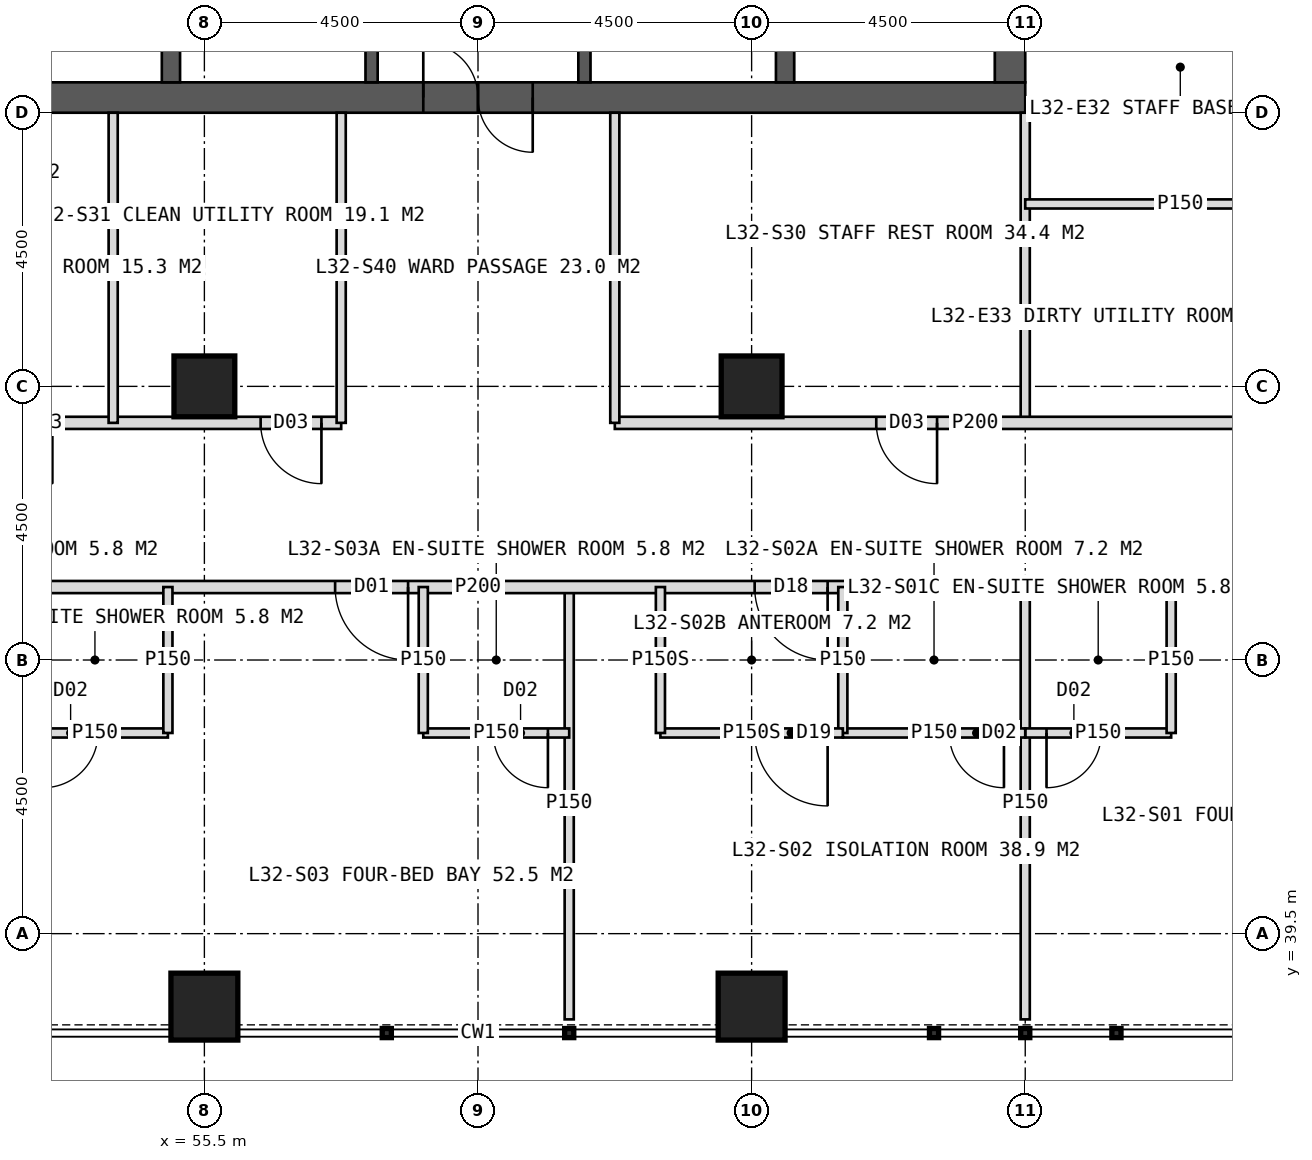
"""IFC4 building model, lengths in metres.
Left out: names, types, materials, properties, quantities, classifications, styles, units other than length and angle.
Written with IfcOpenShell. Run it as: python <this file> out.ifc"""

import sys

from ifc_helpers import new_model, si_unit, direction, frame, frame_2d, origin, origin_2d, place, context, subcontext, project, spatial, rectangle, hollow_rectangle, extrude, element, fill, save


model = new_model("IFC4")
c1 = context("Model", 3, precision=1e-05, world=origin(), true_north=direction((0.0, 1.0)))
c2 = subcontext(c1, "Body", "Model", "MODEL_VIEW")
j1 = project(units=[si_unit("LENGTHUNIT", "METRE"), si_unit("PLANEANGLEUNIT", "RADIAN")], contexts=[c1])
p1 = place(None, origin())
s1 = spatial("IfcSite", under=j1, at=p1, CompositionType="ELEMENT")
p2 = place(p1, origin())
s2 = spatial("IfcBuilding", under=s1, at=p2, CompositionType="ELEMENT")
p3 = place(p2, frame((0.0, 0.0, 136.0)))
s3 = spatial("IfcBuildingStorey", under=s2, at=p3, CompositionType="ELEMENT", Elevation=136.0)
p4 = place(p3, frame((51.0, 53.25, 0.0), z_axis=(0.0, 0.0, 1.0), x_axis=(1.0, 0.0, 0.0)))
e1 = element("IfcWall", 1, at=p4, inside=s3, PredefinedType="SHEAR", context=c2, shape_type="SweptSolid", body=[
    extrude(rectangle(XDim=18.0, YDim=0.5, at=frame_2d((9.0, 0.0))), origin(), (0.0, 0.0, 1.0), 4.0),
])
p5 = place(p4, frame((8.1, 0.0, 0.0)))
e2 = element("IfcOpeningElement", 2, at=p5, cuts=e1, PredefinedType="OPENING", context=c2, shape_type="SweptSolid", body=[
    extrude(rectangle(XDim=1.8, YDim=2.2, at=frame_2d((0.9, 1.1))), frame((0.0, 0.26, 0.0), z_axis=(0.0, -1.0, 0.0), x_axis=(1.0, 0.0, 0.0)), (0.0, 0.0, 1.0), 0.52),
])
p6 = place(p3, frame((68.75, 53.5, 0.0), z_axis=(0.0, 0.0, 1.0), x_axis=(0.0, 1.0, 0.0)))
e3 = element("IfcWall", 3, at=p6, inside=s3, PredefinedType="SHEAR", context=c2, shape_type="SweptSolid", body=[
    extrude(rectangle(XDim=17.0, YDim=0.5, at=frame_2d((8.5, 0.0))), origin(), (0.0, 0.0, 1.0), 4.0),
])
p7 = place(p6, frame((9.5, 0.0, 0.0)))
e4 = element("IfcOpeningElement", 4, at=p7, cuts=e3, PredefinedType="OPENING", context=c2, shape_type="SweptSolid", body=[
    extrude(rectangle(XDim=1.5, YDim=2.2, at=frame_2d((0.75, 1.1))), frame((0.0, 0.26, 0.0), z_axis=(0.0, -1.0, 0.0), x_axis=(1.0, 0.0, 0.0)), (0.0, 0.0, 1.0), 0.52),
])
for number, where, z_axis, x_axis in (
    (5, (54.95, 53.5, 0.0), (0.0, 0.0, 1.0), (0.0, 1.0, 0.0)),
    (6, (65.05, 53.5, 0.0), (0.0, 0.0, 1.0), (0.0, 1.0, 0.0)),
):
    element("IfcWall", number, at=place(p3, frame(where, z_axis=z_axis, x_axis=x_axis)), inside=s3, PredefinedType="SHEAR", context=c2, shape_type="SweptSolid", body=[
        extrude(rectangle(XDim=17.0, YDim=0.3, at=frame_2d((8.5, 0.0))), origin(), (0.0, 0.0, 1.0), 4.0),
    ])
p8 = place(p3, frame((58.25, 53.5, 0.0), z_axis=(0.0, 0.0, 1.0), x_axis=(0.0, 1.0, 0.0)))
e7 = element("IfcWall", 7, at=p8, inside=s3, PredefinedType="SHEAR", context=c2, shape_type="SweptSolid", body=[
    extrude(rectangle(XDim=17.0, YDim=0.2, at=frame_2d((8.5, 0.0))), origin(), (0.0, 0.0, 1.0), 4.0),
])
p9 = place(p8, frame((1.375, 0.0, 0.0)))
e8 = element("IfcOpeningElement", 8, at=p9, cuts=e7, PredefinedType="OPENING", context=c2, shape_type="SweptSolid", body=[
    extrude(rectangle(XDim=1.4, YDim=2.2, at=frame_2d((0.7, 1.1))), frame((0.0, 0.11, 0.0), z_axis=(0.0, -1.0, 0.0), x_axis=(1.0, 0.0, 0.0)), (0.0, 0.0, 1.0), 0.22),
])
p10 = place(p8, frame((5.675, 0.0, 0.0)))
e9 = element("IfcOpeningElement", 9, at=p10, cuts=e7, PredefinedType="OPENING", context=c2, shape_type="SweptSolid", body=[
    extrude(rectangle(XDim=1.4, YDim=2.2, at=frame_2d((0.7, 1.1))), frame((0.0, 0.11, 0.0), z_axis=(0.0, -1.0, 0.0), x_axis=(1.0, 0.0, 0.0)), (0.0, 0.0, 1.0), 0.22),
])
p11 = place(p3, frame((61.75, 53.5, 0.0), z_axis=(0.0, 0.0, 1.0), x_axis=(0.0, 1.0, 0.0)))
e10 = element("IfcWall", 10, at=p11, inside=s3, PredefinedType="SHEAR", context=c2, shape_type="SweptSolid", body=[
    extrude(rectangle(XDim=17.0, YDim=0.2, at=frame_2d((8.5, 0.0))), origin(), (0.0, 0.0, 1.0), 4.0),
])
p12 = place(p11, frame((1.375, 0.0, 0.0)))
e11 = element("IfcOpeningElement", 11, at=p12, cuts=e10, PredefinedType="OPENING", context=c2, shape_type="SweptSolid", body=[
    extrude(rectangle(XDim=1.4, YDim=2.2, at=frame_2d((0.7, 1.1))), frame((0.0, 0.11, 0.0), z_axis=(0.0, -1.0, 0.0), x_axis=(1.0, 0.0, 0.0)), (0.0, 0.0, 1.0), 0.22),
])
p13 = place(p11, frame((5.675, 0.0, 0.0)))
e12 = element("IfcOpeningElement", 12, at=p13, cuts=e10, PredefinedType="OPENING", context=c2, shape_type="SweptSolid", body=[
    extrude(rectangle(XDim=1.4, YDim=2.2, at=frame_2d((0.7, 1.1))), frame((0.0, 0.11, 0.0), z_axis=(0.0, -1.0, 0.0), x_axis=(1.0, 0.0, 0.0)), (0.0, 0.0, 1.0), 0.22),
])
for number, where, z_axis, x_axis in (
    (13, (55.5, 48.5, 0.0), (0.0, 0.0, 1.0), (1.0, 0.0, 0.0)),
    (14, (64.5, 48.5, 0.0), (0.0, 0.0, 1.0), (1.0, 0.0, 0.0)),
):
    element("IfcColumn", number, at=place(p3, frame(where, z_axis=z_axis, x_axis=x_axis)), inside=s3, PredefinedType="COLUMN", context=c2, shape_type="SweptSolid", body=[
        extrude(hollow_rectangle(XDim=1.0, YDim=1.0, WallThickness=0.1, at=origin_2d()), origin(), (0.0, 0.0, 1.0), 4.0),
    ])
for number, where, z_axis, x_axis in (
    (15, (55.5, 38.3, 0.0), (0.0, 0.0, 1.0), (1.0, 0.0, 0.0)),
    (16, (64.5, 38.3, 0.0), (0.0, 0.0, 1.0), (1.0, 0.0, 0.0)),
):
    element("IfcColumn", number, at=place(p3, frame(where, z_axis=z_axis, x_axis=x_axis)), inside=s3, PredefinedType="COLUMN", context=c2, shape_type="SweptSolid", body=[
        extrude(hollow_rectangle(XDim=1.1, YDim=1.1, WallThickness=0.1, at=origin_2d()), origin(), (0.0, 0.0, 1.0), 4.0),
    ])
for number, where, z_axis, x_axis in (
    (17, (69.0, 45.2, 0.0), (0.0, 0.0, 1.0), (0.0, -1.0, 0.0)),
    (18, (61.5, 45.2, 0.0), (0.0, 0.0, 1.0), (0.0, -1.0, 0.0)),
):
    element("IfcWall", number, at=place(p3, frame(where, z_axis=z_axis, x_axis=x_axis)), inside=s3, PredefinedType="PARTITIONING", context=c2, shape_type="SweptSolid", body=[
        extrude(rectangle(XDim=7.11, YDim=0.15, at=frame_2d((3.555, 0.0))), origin(), (0.0, 0.0, 1.0), 3.75),
    ])
p14 = place(p3, frame((76.8, 45.2, 0.0), z_axis=(0.0, 0.0, 1.0), x_axis=(-1.0, 0.0, 0.0)))
e19 = element("IfcWall", 19, at=p14, inside=s3, PredefinedType="PARTITIONING", context=c2, shape_type="SweptSolid", body=[
    extrude(rectangle(XDim=33.6, YDim=0.2, at=frame_2d((16.8, 0.0))), origin(), (0.0, 0.0, 1.0), 3.75),
])
p15 = place(p14, frame((2.65, 0.0, 0.0)))
e20 = element("IfcOpeningElement", 20, at=p15, cuts=e19, PredefinedType="OPENING", context=c2, shape_type="SweptSolid", body=[
    extrude(rectangle(XDim=1.2, YDim=2.2, at=frame_2d((0.6, 1.1))), frame((0.0, 0.11, 0.0), z_axis=(0.0, -1.0, 0.0), x_axis=(1.0, 0.0, 0.0)), (0.0, 0.0, 1.0), 0.22),
])
p16 = place(p14, frame((11.05, 0.0, 0.0)))
e21 = element("IfcOpeningElement", 21, at=p16, cuts=e19, PredefinedType="OPENING", context=c2, shape_type="SweptSolid", body=[
    extrude(rectangle(XDim=1.2, YDim=2.2, at=frame_2d((0.6, 1.1))), frame((0.0, 0.11, 0.0), z_axis=(0.0, -1.0, 0.0), x_axis=(1.0, 0.0, 0.0)), (0.0, 0.0, 1.0), 0.22),
])
p17 = place(p14, frame((17.95, 0.0, 0.0)))
e22 = element("IfcOpeningElement", 22, at=p17, cuts=e19, PredefinedType="OPENING", context=c2, shape_type="SweptSolid", body=[
    extrude(rectangle(XDim=1.2, YDim=2.2, at=frame_2d((0.6, 1.1))), frame((0.0, 0.11, 0.0), z_axis=(0.0, -1.0, 0.0), x_axis=(1.0, 0.0, 0.0)), (0.0, 0.0, 1.0), 0.22),
])
p18 = place(p14, frame((26.95, 0.0, 0.0)))
e23 = element("IfcOpeningElement", 23, at=p18, cuts=e19, PredefinedType="OPENING", context=c2, shape_type="SweptSolid", body=[
    extrude(rectangle(XDim=1.2, YDim=2.2, at=frame_2d((0.6, 1.1))), frame((0.0, 0.11, 0.0), z_axis=(0.0, -1.0, 0.0), x_axis=(1.0, 0.0, 0.0)), (0.0, 0.0, 1.0), 0.22),
])
p19 = place(p3, frame((71.4, 42.8, 0.0), z_axis=(0.0, 0.0, 1.0), x_axis=(-1.0, 0.0, 0.0)))
e24 = element("IfcWall", 24, at=p19, inside=s3, PredefinedType="PARTITIONING", context=c2, shape_type="SweptSolid", body=[
    extrude(rectangle(XDim=2.4, YDim=0.15, at=frame_2d((1.2, 0.0))), origin(), (0.0, 0.0, 1.0), 3.75),
])
p20 = place(p19, frame((1.15, 0.0, 0.0)))
e25 = element("IfcOpeningElement", 25, at=p20, cuts=e24, PredefinedType="OPENING", context=c2, shape_type="SweptSolid", body=[
    extrude(rectangle(XDim=0.9, YDim=2.1, at=frame_2d((0.45, 1.05))), frame((0.0, 0.085, 0.0), z_axis=(0.0, -1.0, 0.0), x_axis=(1.0, 0.0, 0.0)), (0.0, 0.0, 1.0), 0.17),
])
p21 = place(p3, frame((71.4, 45.2, 0.0), z_axis=(0.0, 0.0, 1.0), x_axis=(0.0, -1.0, 0.0)))
e26 = element("IfcWall", 26, at=p21, inside=s3, PredefinedType="PARTITIONING", context=c2, shape_type="SweptSolid", body=[
    extrude(rectangle(XDim=2.4, YDim=0.15, at=frame_2d((1.2, 0.0))), origin(), (0.0, 0.0, 1.0), 3.75),
])
p22 = place(p3, frame((69.0, 42.8, 0.0), z_axis=(0.0, 0.0, 1.0), x_axis=(-1.0, 0.0, 0.0)))
e27 = element("IfcWall", 27, at=p22, inside=s3, PredefinedType="PARTITIONING", context=c2, shape_type="SweptSolid", body=[
    extrude(rectangle(XDim=3.0, YDim=0.15, at=frame_2d((1.5, 0.0))), origin(), (0.0, 0.0, 1.0), 3.75),
])
p23 = place(p22, frame((0.35, 0.0, 0.0)))
e28 = element("IfcOpeningElement", 28, at=p23, cuts=e27, PredefinedType="OPENING", context=c2, shape_type="SweptSolid", body=[
    extrude(rectangle(XDim=0.9, YDim=2.1, at=frame_2d((0.45, 1.05))), frame((0.0, 0.085, 0.0), z_axis=(0.0, -1.0, 0.0), x_axis=(1.0, 0.0, 0.0)), (0.0, 0.0, 1.0), 0.17),
])
p24 = place(p3, frame((66.0, 45.2, 0.0), z_axis=(0.0, 0.0, 1.0), x_axis=(0.0, -1.0, 0.0)))
e29 = element("IfcWall", 29, at=p24, inside=s3, PredefinedType="PARTITIONING", context=c2, shape_type="SweptSolid", body=[
    extrude(rectangle(XDim=2.4, YDim=0.15, at=frame_2d((1.2, 0.0))), origin(), (0.0, 0.0, 1.0), 3.75),
])
p25 = place(p3, frame((66.0, 42.8, 0.0), z_axis=(0.0, 0.0, 1.0), x_axis=(-1.0, 0.0, 0.0)))
e30 = element("IfcWall", 30, at=p25, inside=s3, PredefinedType="PARTITIONING", context=c2, shape_type="SweptSolid", body=[
    extrude(rectangle(XDim=3.0, YDim=0.15, at=frame_2d((1.5, 0.0))), origin(), (0.0, 0.0, 1.0), 3.75),
])
p26 = place(p25, frame((0.25, 0.0, 0.0)))
e31 = element("IfcOpeningElement", 31, at=p26, cuts=e30, PredefinedType="OPENING", context=c2, shape_type="SweptSolid", body=[
    extrude(rectangle(XDim=1.2, YDim=2.2, at=frame_2d((0.6, 1.1))), frame((0.0, 0.085, 0.0), z_axis=(0.0, -1.0, 0.0), x_axis=(1.0, 0.0, 0.0)), (0.0, 0.0, 1.0), 0.17),
])
p27 = place(p3, frame((63.0, 45.2, 0.0), z_axis=(0.0, 0.0, 1.0), x_axis=(0.0, -1.0, 0.0)))
e32 = element("IfcWall", 32, at=p27, inside=s3, PredefinedType="PARTITIONING", context=c2, shape_type="SweptSolid", body=[
    extrude(rectangle(XDim=2.4, YDim=0.15, at=frame_2d((1.2, 0.0))), origin(), (0.0, 0.0, 1.0), 3.75),
])
p28 = place(p3, frame((61.5, 42.8, 0.0), z_axis=(0.0, 0.0, 1.0), x_axis=(-1.0, 0.0, 0.0)))
e33 = element("IfcWall", 33, at=p28, inside=s3, PredefinedType="PARTITIONING", context=c2, shape_type="SweptSolid", body=[
    extrude(rectangle(XDim=2.4, YDim=0.15, at=frame_2d((1.2, 0.0))), origin(), (0.0, 0.0, 1.0), 3.75),
])
p29 = place(p28, frame((0.35, 0.0, 0.0)))
e34 = element("IfcOpeningElement", 34, at=p29, cuts=e33, PredefinedType="OPENING", context=c2, shape_type="SweptSolid", body=[
    extrude(rectangle(XDim=0.9, YDim=2.1, at=frame_2d((0.45, 1.05))), frame((0.0, 0.085, 0.0), z_axis=(0.0, -1.0, 0.0), x_axis=(1.0, 0.0, 0.0)), (0.0, 0.0, 1.0), 0.17),
])
p30 = place(p3, frame((59.1, 45.2, 0.0), z_axis=(0.0, 0.0, 1.0), x_axis=(0.0, -1.0, 0.0)))
e35 = element("IfcWall", 35, at=p30, inside=s3, PredefinedType="PARTITIONING", context=c2, shape_type="SweptSolid", body=[
    extrude(rectangle(XDim=2.4, YDim=0.15, at=frame_2d((1.2, 0.0))), origin(), (0.0, 0.0, 1.0), 3.75),
])
p31 = place(p3, frame((54.9, 42.8, 0.0), z_axis=(0.0, 0.0, 1.0), x_axis=(-1.0, 0.0, 0.0)))
e36 = element("IfcWall", 36, at=p31, inside=s3, PredefinedType="PARTITIONING", context=c2, shape_type="SweptSolid", body=[
    extrude(rectangle(XDim=2.4, YDim=0.15, at=frame_2d((1.2, 0.0))), origin(), (0.0, 0.0, 1.0), 3.75),
])
p32 = place(p31, frame((1.15, 0.0, 0.0)))
e37 = element("IfcOpeningElement", 37, at=p32, cuts=e36, PredefinedType="OPENING", context=c2, shape_type="SweptSolid", body=[
    extrude(rectangle(XDim=0.9, YDim=2.1, at=frame_2d((0.45, 1.05))), frame((0.0, 0.085, 0.0), z_axis=(0.0, -1.0, 0.0), x_axis=(1.0, 0.0, 0.0)), (0.0, 0.0, 1.0), 0.17),
])
p33 = place(p3, frame((54.9, 45.2, 0.0), z_axis=(0.0, 0.0, 1.0), x_axis=(0.0, -1.0, 0.0)))
e38 = element("IfcWall", 38, at=p33, inside=s3, PredefinedType="PARTITIONING", context=c2, shape_type="SweptSolid", body=[
    extrude(rectangle(XDim=2.4, YDim=0.15, at=frame_2d((1.2, 0.0))), origin(), (0.0, 0.0, 1.0), 3.75),
])
p34 = place(p3, frame((69.0, 53.0, 0.0), z_axis=(0.0, 0.0, 1.0), x_axis=(0.0, -1.0, 0.0)))
e39 = element("IfcWall", 39, at=p34, inside=s3, PredefinedType="PARTITIONING", context=c2, shape_type="SweptSolid", body=[
    extrude(rectangle(XDim=5.1, YDim=0.15, at=frame_2d((2.55, 0.0))), origin(), (0.0, 0.0, 1.0), 3.75),
])
p35 = place(p3, frame((74.1, 47.9, 0.0), z_axis=(0.0, 0.0, 1.0), x_axis=(-1.0, 0.0, 0.0)))
e40 = element("IfcWall", 40, at=p35, inside=s3, PredefinedType="PARTITIONING", context=c2, shape_type="SweptSolid", body=[
    extrude(rectangle(XDim=11.85, YDim=0.2, at=frame_2d((5.925, 0.0))), origin(), (0.0, 0.0, 1.0), 3.75),
])
p36 = place(p35, frame((6.55, 0.0, 0.0)))
e41 = element("IfcOpeningElement", 41, at=p36, cuts=e40, PredefinedType="OPENING", context=c2, shape_type="SweptSolid", body=[
    extrude(rectangle(XDim=1.0, YDim=2.1, at=frame_2d((0.5, 1.05))), frame((0.0, 0.11, 0.0), z_axis=(0.0, -1.0, 0.0), x_axis=(1.0, 0.0, 0.0)), (0.0, 0.0, 1.0), 0.22),
])
p37 = place(p3, frame((57.75, 47.9, 0.0), z_axis=(0.0, 0.0, 1.0), x_axis=(-1.0, 0.0, 0.0)))
e42 = element("IfcWall", 42, at=p37, inside=s3, PredefinedType="PARTITIONING", context=c2, shape_type="SweptSolid", body=[
    extrude(rectangle(XDim=11.85, YDim=0.2, at=frame_2d((5.925, 0.0))), origin(), (0.0, 0.0, 1.0), 3.75),
])
p38 = place(p37, frame((0.325, 0.0, 0.0)))
e43 = element("IfcOpeningElement", 43, at=p38, cuts=e42, PredefinedType="OPENING", context=c2, shape_type="SweptSolid", body=[
    extrude(rectangle(XDim=1.0, YDim=2.1, at=frame_2d((0.5, 1.05))), frame((0.0, 0.11, 0.0), z_axis=(0.0, -1.0, 0.0), x_axis=(1.0, 0.0, 0.0)), (0.0, 0.0, 1.0), 0.22),
])
p39 = place(p37, frame((4.75, 0.0, 0.0)))
e44 = element("IfcOpeningElement", 44, at=p39, cuts=e42, PredefinedType="OPENING", context=c2, shape_type="SweptSolid", body=[
    extrude(rectangle(XDim=1.0, YDim=2.1, at=frame_2d((0.5, 1.05))), frame((0.0, 0.11, 0.0), z_axis=(0.0, -1.0, 0.0), x_axis=(1.0, 0.0, 0.0)), (0.0, 0.0, 1.0), 0.22),
])
p40 = place(p37, frame((8.8, 0.0, 0.0)))
e45 = element("IfcOpeningElement", 45, at=p40, cuts=e42, PredefinedType="OPENING", context=c2, shape_type="SweptSolid", body=[
    extrude(rectangle(XDim=1.0, YDim=2.1, at=frame_2d((0.5, 1.05))), frame((0.0, 0.11, 0.0), z_axis=(0.0, -1.0, 0.0), x_axis=(1.0, 0.0, 0.0)), (0.0, 0.0, 1.0), 0.22),
])
for number, where, z_axis, x_axis in (
    (46, (62.25, 53.0, 0.0), (0.0, 0.0, 1.0), (0.0, -1.0, 0.0)),
    (47, (57.75, 53.0, 0.0), (0.0, 0.0, 1.0), (0.0, -1.0, 0.0)),
    (48, (54.0, 53.0, 0.0), (0.0, 0.0, 1.0), (0.0, -1.0, 0.0)),
    (49, (69.0, 51.5, 0.0), (0.0, 0.0, 1.0), (1.0, 0.0, 0.0)),
):
    element("IfcWall", number, at=place(p3, frame(where, z_axis=z_axis, x_axis=x_axis)), inside=s3, PredefinedType="PARTITIONING", context=c2, shape_type="SweptSolid", body=[
        extrude(rectangle(XDim=5.1, YDim=0.15, at=frame_2d((2.55, 0.0))), origin(), (0.0, 0.0, 1.0), 3.75),
    ])
p41 = place(p20, origin())
e50 = element("IfcDoor", 50, at=p41, inside=s3, OperationType="SINGLE_SWING_RIGHT", PredefinedType="DOOR", context=c2, shape_type="SweptSolid", body=[
    extrude(rectangle(XDim=0.9, YDim=2.1, at=frame_2d((0.45, 1.05))), frame((0.0, 0.025, 0.0), z_axis=(0.0, -1.0, 0.0), x_axis=(1.0, 0.0, 0.0)), (0.0, 0.0, 1.0), 0.05),
])
fill(e25, e50)
p42 = place(p26, origin())
e51 = element("IfcDoor", 51, at=p42, inside=s3, OperationType="SINGLE_SWING_LEFT", PredefinedType="DOOR", context=c2, shape_type="SweptSolid", body=[
    extrude(rectangle(XDim=1.2, YDim=2.2, at=frame_2d((0.6, 1.1))), frame((0.0, 0.025, 0.0), z_axis=(0.0, -1.0, 0.0), x_axis=(1.0, 0.0, 0.0)), (0.0, 0.0, 1.0), 0.05),
])
fill(e31, e51)
p43 = place(p16, origin())
e52 = element("IfcDoor", 52, at=p43, inside=s3, OperationType="SINGLE_SWING_LEFT", PredefinedType="DOOR", context=c2, shape_type="SweptSolid", body=[
    extrude(rectangle(XDim=1.2, YDim=2.2, at=frame_2d((0.6, 1.1))), frame((0.0, 0.025, 0.0), z_axis=(0.0, -1.0, 0.0), x_axis=(1.0, 0.0, 0.0)), (0.0, 0.0, 1.0), 0.05),
])
fill(e21, e52)
p44 = place(p23, origin())
e53 = element("IfcDoor", 53, at=p44, inside=s3, OperationType="SINGLE_SWING_LEFT", PredefinedType="DOOR", context=c2, shape_type="SweptSolid", body=[
    extrude(rectangle(XDim=0.9, YDim=2.1, at=frame_2d((0.45, 1.05))), frame((0.0, 0.025, 0.0), z_axis=(0.0, -1.0, 0.0), x_axis=(1.0, 0.0, 0.0)), (0.0, 0.0, 1.0), 0.05),
])
fill(e28, e53)
p45 = place(p17, origin())
e54 = element("IfcDoor", 54, at=p45, inside=s3, OperationType="SINGLE_SWING_LEFT", PredefinedType="DOOR", context=c2, shape_type="SweptSolid", body=[
    extrude(rectangle(XDim=1.2, YDim=2.2, at=frame_2d((0.6, 1.1))), frame((0.0, 0.025, 0.0), z_axis=(0.0, -1.0, 0.0), x_axis=(1.0, 0.0, 0.0)), (0.0, 0.0, 1.0), 0.05),
])
fill(e22, e54)
p46 = place(p29, origin())
e55 = element("IfcDoor", 55, at=p46, inside=s3, OperationType="SINGLE_SWING_LEFT", PredefinedType="DOOR", context=c2, shape_type="SweptSolid", body=[
    extrude(rectangle(XDim=0.9, YDim=2.1, at=frame_2d((0.45, 1.05))), frame((0.0, 0.025, 0.0), z_axis=(0.0, -1.0, 0.0), x_axis=(1.0, 0.0, 0.0)), (0.0, 0.0, 1.0), 0.05),
])
fill(e34, e55)
p47 = place(p32, origin())
e56 = element("IfcDoor", 56, at=p47, inside=s3, OperationType="SINGLE_SWING_RIGHT", PredefinedType="DOOR", context=c2, shape_type="SweptSolid", body=[
    extrude(rectangle(XDim=0.9, YDim=2.1, at=frame_2d((0.45, 1.05))), frame((0.0, 0.025, 0.0), z_axis=(0.0, -1.0, 0.0), x_axis=(1.0, 0.0, 0.0)), (0.0, 0.0, 1.0), 0.05),
])
fill(e37, e56)
p48 = place(p36, origin())
e57 = element("IfcDoor", 57, at=p48, inside=s3, OperationType="SINGLE_SWING_LEFT", PredefinedType="DOOR", context=c2, shape_type="SweptSolid", body=[
    extrude(rectangle(XDim=1.0, YDim=2.1, at=frame_2d((0.5, 1.05))), frame((0.0, 0.025, 0.0), z_axis=(0.0, -1.0, 0.0), x_axis=(1.0, 0.0, 0.0)), (0.0, 0.0, 1.0), 0.05),
])
fill(e41, e57)
p49 = place(p38, origin())
e58 = element("IfcDoor", 58, at=p49, inside=s3, OperationType="SINGLE_SWING_LEFT", PredefinedType="DOOR", context=c2, shape_type="SweptSolid", body=[
    extrude(rectangle(XDim=1.0, YDim=2.1, at=frame_2d((0.5, 1.05))), frame((0.0, 0.025, 0.0), z_axis=(0.0, -1.0, 0.0), x_axis=(1.0, 0.0, 0.0)), (0.0, 0.0, 1.0), 0.05),
])
fill(e43, e58)
p50 = place(p5, origin())
e59 = element("IfcDoor", 59, at=p50, inside=s3, OperationType="DOUBLE_DOOR_SINGLE_SWING", PredefinedType="DOOR", context=c2, shape_type="SweptSolid", body=[
    extrude(rectangle(XDim=1.8, YDim=2.2, at=frame_2d((0.9, 1.1))), frame((0.0, 0.025, 0.0), z_axis=(0.0, -1.0, 0.0), x_axis=(1.0, 0.0, 0.0)), (0.0, 0.0, 1.0), 0.05),
])
fill(e2, e59)
save(model, sys.argv[1])
